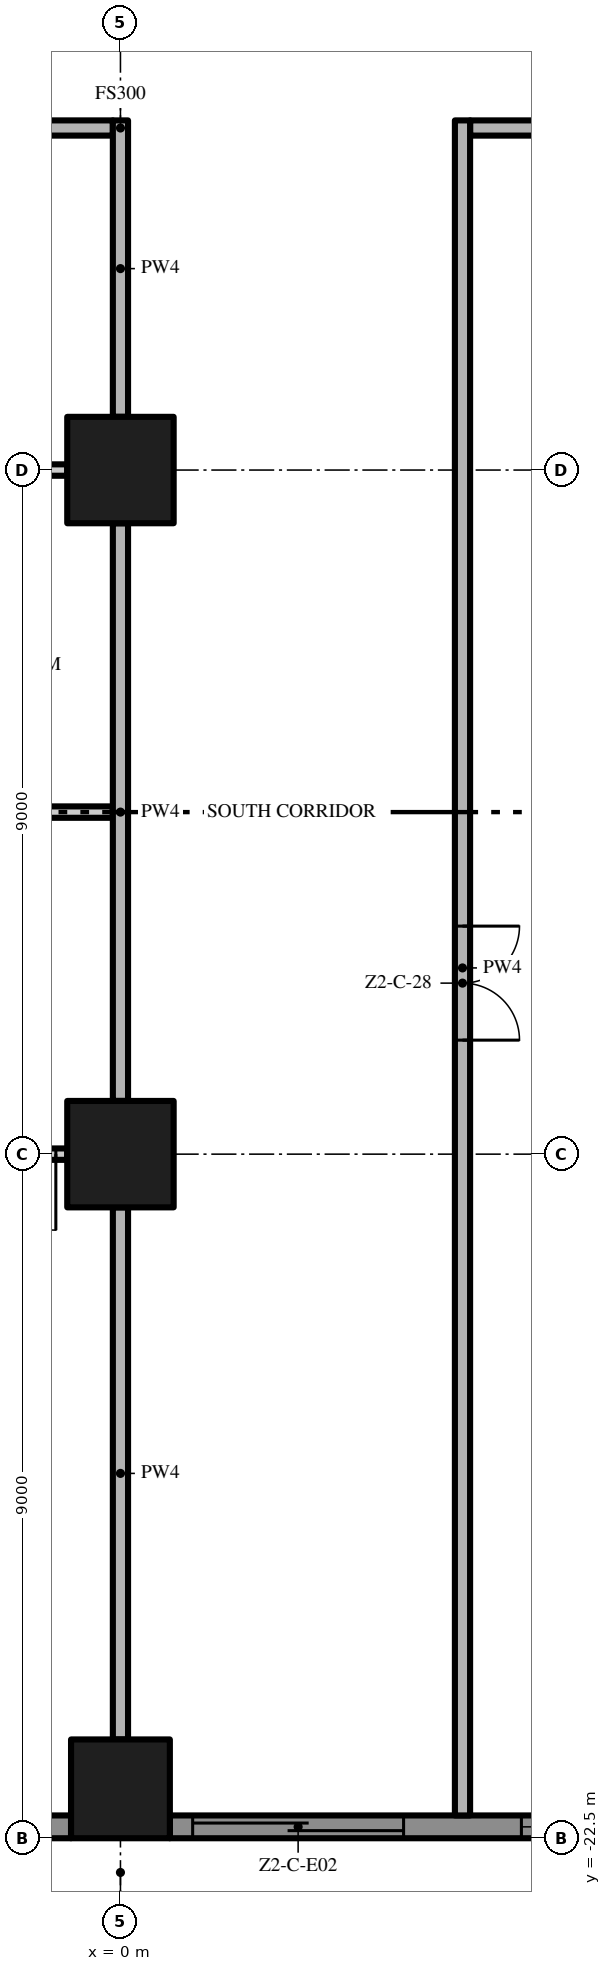
"""IFC4 building model, lengths in metres.
Left out: names, types, materials, properties, quantities, classifications, styles, units other than length and angle.
Written with IfcOpenShell. Run it as: python <this file> out.ifc"""

import sys

from ifc_helpers import new_model, si_unit, direction, frame, frame_2d, origin, origin_2d, place, context, subcontext, project, spatial, polyline, rectangle, outline, extrude, element, fill, save


model = new_model("IFC4")
c1 = context("Model", 3, precision=1e-05, world=origin(), true_north=direction((0.0, 1.0)))
c2 = subcontext(c1, "Body", "Model", "MODEL_VIEW")
j1 = project(units=[si_unit("LENGTHUNIT", "METRE"), si_unit("PLANEANGLEUNIT", "RADIAN")], contexts=[c1])
p1 = place(None, origin())
s1 = spatial("IfcSite", under=j1, at=p1, CompositionType="ELEMENT")
p2 = place(p1, origin())
s2 = spatial("IfcBuilding", under=s1, at=p2, CompositionType="ELEMENT")
p3 = place(p2, frame((0.0, 0.0, 96.0)))
s3 = spatial("IfcBuildingStorey", under=s2, at=p3, CompositionType="ELEMENT", Elevation=96.0)
p4 = place(p3, frame((0.0, -13.5, 0.0), z_axis=(0.0, 0.0, 1.0), x_axis=(1.0, 0.0, 0.0)))
e1 = element("IfcColumn", 1, at=p4, inside=s3, PredefinedType="COLUMN", context=c2, shape_type="SweptSolid", body=[
    extrude(rectangle(XDim=1.4, YDim=1.4, at=origin_2d()), origin(), (0.0, 0.0, 1.0), 3.5),
])
p5 = place(p3, frame((0.0, -21.85, 0.0), z_axis=(0.0, 0.0, 1.0), x_axis=(1.0, 0.0, 0.0)))
e2 = element("IfcColumn", 2, at=p5, inside=s3, PredefinedType="COLUMN", context=c2, shape_type="SweptSolid", body=[
    extrude(rectangle(XDim=1.3, YDim=1.3, at=origin_2d()), origin(), (0.0, 0.0, 1.0), 3.5),
])
p6 = place(p3, frame((0.0, -4.5, 0.0), z_axis=(0.0, 0.0, 1.0), x_axis=(1.0, 0.0, 0.0)))
e3 = element("IfcColumn", 3, at=p6, inside=s3, PredefinedType="COLUMN", context=c2, shape_type="SweptSolid", body=[
    extrude(rectangle(XDim=1.4, YDim=1.4, at=origin_2d()), origin(), (0.0, 0.0, 1.0), 3.5),
])
p7 = place(p3, frame((-0.65, -22.35, 0.0), z_axis=(0.0, 0.0, 1.0), x_axis=(-1.0, 0.0, 0.0)))
e4 = element("IfcWall", 4, at=p7, inside=s3, PredefinedType="SOLIDWALL", context=c2, shape_type="SweptSolid", body=[
    extrude(rectangle(XDim=7.7, YDim=0.3, at=frame_2d((3.85, 0.0))), origin(), (0.0, 0.0, 1.0), 3.5),
])
p8 = place(p7, frame((4.625, 0.0, 0.45)))
e5 = element("IfcOpeningElement", 5, at=p8, cuts=e4, PredefinedType="OPENING", context=c2, shape_type="SweptSolid", body=[
    extrude(rectangle(XDim=2.775, YDim=2.65, at=frame_2d((1.387, 1.325))), frame((0.0, 0.16, 0.0), z_axis=(0.0, -1.0, 0.0), x_axis=(1.0, 0.0, 0.0)), (0.0, 0.0, 1.0), 0.32),
])
p9 = place(p7, frame((0.3, 0.0, 0.45)))
e6 = element("IfcOpeningElement", 6, at=p9, cuts=e4, PredefinedType="OPENING", context=c2, shape_type="SweptSolid", body=[
    extrude(rectangle(XDim=2.775, YDim=2.65, at=frame_2d((1.387, 1.325))), frame((0.0, 0.16, 0.0), z_axis=(0.0, -1.0, 0.0), x_axis=(1.0, 0.0, 0.0)), (0.0, 0.0, 1.0), 0.32),
])
p10 = place(p3, frame((8.35, -22.35, 0.0), z_axis=(0.0, 0.0, 1.0), x_axis=(-1.0, 0.0, 0.0)))
e7 = element("IfcWall", 7, at=p10, inside=s3, PredefinedType="SOLIDWALL", context=c2, shape_type="SweptSolid", body=[
    extrude(rectangle(XDim=7.7, YDim=0.3, at=frame_2d((3.85, 0.0))), origin(), (0.0, 0.0, 1.0), 3.5),
])
p11 = place(p10, frame((4.625, 0.0, 0.0)))
e8 = element("IfcOpeningElement", 8, at=p11, cuts=e7, PredefinedType="OPENING", context=c2, shape_type="SweptSolid", body=[
    extrude(rectangle(XDim=2.775, YDim=2.4, at=frame_2d((1.387, 1.2))), frame((0.0, 0.16, 0.0), z_axis=(0.0, -1.0, 0.0), x_axis=(1.0, 0.0, 0.0)), (0.0, 0.0, 1.0), 0.32),
])
p12 = place(p10, frame((0.3, 0.0, 0.45)))
e9 = element("IfcOpeningElement", 9, at=p12, cuts=e7, PredefinedType="OPENING", context=c2, shape_type="SweptSolid", body=[
    extrude(rectangle(XDim=2.775, YDim=2.65, at=frame_2d((1.387, 1.325))), frame((0.0, 0.16, 0.0), z_axis=(0.0, -1.0, 0.0), x_axis=(1.0, 0.0, 0.0)), (0.0, 0.0, 1.0), 0.32),
])
p13 = place(p3, origin())
e10 = element("IfcWall", 10, at=p13, inside=s3, PredefinedType="USERDEFINED", context=c2, shape_type="SweptSolid", body=[
    extrude(outline(polyline([(-22.5, -23.451), (-21.0, -23.115), (-20.625, -23.1), (-19.5, -23.231), (-18.0, -23.755), (-16.5, -24.488), (-15.0, -25.149), (-13.5, -25.485), (-13.125, -25.5), (-12.0, -25.369), (-10.5, -24.845), (-9.0, -24.112), (-7.5, -23.451), (-6.0, -23.115), (-5.625, -23.1), (-4.5, -23.231), (-3.0, -23.755), (-1.5, -24.488), (0.0, -25.149), (1.5, -25.485), (1.875, -25.5), (3.0, -25.369), (4.5, -24.845), (6.0, -24.112), (7.5, -23.451), (9.0, -23.115), (9.375, -23.1), (10.5, -23.231), (12.0, -23.755), (13.5, -24.488), (15.0, -25.149), (16.5, -25.485), (16.875, -25.5), (18.0, -25.369), (19.5, -24.845), (21.0, -24.112), (22.5, -23.451), (22.399, -23.223), (20.895, -23.885), (19.404, -24.614), (17.944, -25.124), (16.865, -25.249), (16.533, -25.236), (15.079, -24.91), (13.605, -24.261), (12.096, -23.524), (10.556, -22.986), (9.385, -22.849), (8.967, -22.866), (7.421, -23.213), (5.895, -23.885), (4.404, -24.614), (2.944, -25.124), (1.865, -25.249), (1.533, -25.236), (0.079, -24.91), (-1.395, -24.261), (-2.904, -23.524), (-4.444, -22.986), (-5.615, -22.849), (-6.033, -22.866), (-7.579, -23.213), (-9.105, -23.885), (-10.596, -24.614), (-12.056, -25.124), (-13.135, -25.249), (-13.467, -25.236), (-14.921, -24.91), (-16.395, -24.261), (-17.904, -23.524), (-19.444, -22.986), (-20.615, -22.849), (-21.033, -22.866), (-22.555, -23.208), (-22.5, -23.451)])), origin(), (0.0, 0.0, 1.0), 0.9),
])
p14 = place(p3, frame((-0.7, -13.5, 0.0), z_axis=(0.0, 0.0, 1.0), x_axis=(-1.0, 0.0, 0.0)))
e11 = element("IfcWall", 11, at=p14, inside=s3, PredefinedType="PARTITIONING", context=c2, shape_type="SweptSolid", body=[
    extrude(rectangle(XDim=7.6, YDim=0.15, at=frame_2d((3.8, 0.0))), origin(), (0.0, 0.0, 1.0), 3.5),
])
p15 = place(p14, frame((6.45, 0.0, 0.0)))
e12 = element("IfcOpeningElement", 12, at=p15, cuts=e11, PredefinedType="OPENING", context=c2, shape_type="SweptSolid", body=[
    extrude(rectangle(XDim=1.0, YDim=2.4, at=frame_2d((0.5, 1.2))), frame((0.0, 0.085, 0.0), z_axis=(0.0, -1.0, 0.0), x_axis=(1.0, 0.0, 0.0)), (0.0, 0.0, 1.0), 0.17),
])
p16 = place(p14, frame((0.15, 0.0, 0.0)))
e13 = element("IfcOpeningElement", 13, at=p16, cuts=e11, PredefinedType="OPENING", context=c2, shape_type="SweptSolid", body=[
    extrude(rectangle(XDim=1.0, YDim=2.4, at=frame_2d((0.5, 1.2))), frame((0.0, 0.085, 0.0), z_axis=(0.0, -1.0, 0.0), x_axis=(1.0, 0.0, 0.0)), (0.0, 0.0, 1.0), 0.17),
])
p17 = place(p3, frame((-11.925, -9.0, 0.0), z_axis=(0.0, 0.0, 1.0), x_axis=(1.0, 0.0, 0.0)))
e14 = element("IfcWall", 14, at=p17, inside=s3, PredefinedType="PARTITIONING", context=c2, shape_type="SweptSolid", body=[
    extrude(rectangle(XDim=11.825, YDim=0.15, at=frame_2d((5.912, 0.0))), origin(), (0.0, 0.0, 1.0), 3.5),
])
p18 = place(p17, frame((1.0, 0.0, 0.0)))
e15 = element("IfcOpeningElement", 15, at=p18, cuts=e14, PredefinedType="OPENING", context=c2, shape_type="SweptSolid", body=[
    extrude(rectangle(XDim=0.9, YDim=2.1, at=frame_2d((0.45, 1.05))), frame((0.0, 0.085, 0.0), z_axis=(0.0, -1.0, 0.0), x_axis=(1.0, 0.0, 0.0)), (0.0, 0.0, 1.0), 0.17),
])
p19 = place(p17, frame((5.075, 0.0, 0.0)))
e16 = element("IfcOpeningElement", 16, at=p19, cuts=e14, PredefinedType="OPENING", context=c2, shape_type="SweptSolid", body=[
    extrude(rectangle(XDim=0.9, YDim=2.1, at=frame_2d((0.45, 1.05))), frame((0.0, 0.085, 0.0), z_axis=(0.0, -1.0, 0.0), x_axis=(1.0, 0.0, 0.0)), (0.0, 0.0, 1.0), 0.17),
])
p20 = place(p3, frame((-8.3, -4.5, 0.0), z_axis=(0.0, 0.0, 1.0), x_axis=(1.0, 0.0, 0.0)))
e17 = element("IfcWall", 17, at=p20, inside=s3, PredefinedType="PARTITIONING", context=c2, shape_type="SweptSolid", body=[
    extrude(rectangle(XDim=7.6, YDim=0.15, at=frame_2d((3.8, 0.0))), origin(), (0.0, 0.0, 1.0), 3.5),
])
p21 = place(p3, frame((-0.1, 0.0, 0.0), z_axis=(0.0, 0.0, 1.0), x_axis=(-1.0, 0.0, 0.0)))
e18 = element("IfcWall", 18, at=p21, inside=s3, PredefinedType="PARTITIONING", context=c2, shape_type="SweptSolid", body=[
    extrude(rectangle(XDim=17.3, YDim=0.2, at=frame_2d((8.65, 0.0))), origin(), (0.0, 0.0, 1.0), 3.5),
])
p22 = place(p21, frame((8.15, 0.0, 0.0)))
e19 = element("IfcOpeningElement", 19, at=p22, cuts=e18, PredefinedType="OPENING", context=c2, shape_type="SweptSolid", body=[
    extrude(rectangle(XDim=1.5, YDim=2.4, at=frame_2d((0.75, 1.2))), frame((0.0, 0.11, 0.0), z_axis=(0.0, -1.0, 0.0), x_axis=(1.0, 0.0, 0.0)), (0.0, 0.0, 1.0), 0.22),
])
p23 = place(p3, frame((4.6, 0.0, 0.0), z_axis=(0.0, 0.0, 1.0), x_axis=(1.0, 0.0, 0.0)))
e20 = element("IfcWall", 20, at=p23, inside=s3, PredefinedType="PARTITIONING", context=c2, shape_type="SweptSolid", body=[
    extrude(rectangle(XDim=12.8, YDim=0.2, at=frame_2d((6.4, 0.0))), origin(), (0.0, 0.0, 1.0), 3.5),
])
p24 = place(p3, frame((0.0, -21.2, 0.0), z_axis=(0.0, 0.0, 1.0), x_axis=(0.0, 1.0, 0.0)))
e21 = element("IfcWall", 21, at=p24, inside=s3, PredefinedType="PARTITIONING", context=c2, shape_type="SweptSolid", body=[
    extrude(rectangle(XDim=7.0, YDim=0.2, at=frame_2d((3.5, 0.0))), origin(), (0.0, 0.0, 1.0), 3.5),
])
p25 = place(p3, frame((0.0, -12.8, 0.0), z_axis=(0.0, 0.0, 1.0), x_axis=(0.0, 1.0, 0.0)))
e22 = element("IfcWall", 22, at=p25, inside=s3, PredefinedType="PARTITIONING", context=c2, shape_type="SweptSolid", body=[
    extrude(rectangle(XDim=7.6, YDim=0.2, at=frame_2d((3.8, 0.0))), origin(), (0.0, 0.0, 1.0), 3.5),
])
p26 = place(p3, frame((0.0, -3.8, 0.0), z_axis=(0.0, 0.0, 1.0), x_axis=(0.0, 1.0, 0.0)))
e23 = element("IfcWall", 23, at=p26, inside=s3, PredefinedType="PARTITIONING", context=c2, shape_type="SweptSolid", body=[
    extrude(rectangle(XDim=3.9, YDim=0.2, at=frame_2d((1.95, 0.0))), origin(), (0.0, 0.0, 1.0), 3.5),
])
p27 = place(p3, frame((4.5, 0.1, 0.0), z_axis=(0.0, 0.0, 1.0), x_axis=(0.0, -1.0, 0.0)))
e24 = element("IfcWall", 24, at=p27, inside=s3, PredefinedType="PARTITIONING", context=c2, shape_type="SweptSolid", body=[
    extrude(rectangle(XDim=22.3, YDim=0.2, at=frame_2d((11.15, 0.0))), origin(), (0.0, 0.0, 1.0), 3.5),
])
p28 = place(p27, frame((10.6, 0.0, 0.0)))
e25 = element("IfcOpeningElement", 25, at=p28, cuts=e24, PredefinedType="OPENING", context=c2, shape_type="SweptSolid", body=[
    extrude(rectangle(XDim=1.5, YDim=2.4, at=frame_2d((0.75, 1.2))), frame((0.0, 0.11, 0.0), z_axis=(0.0, -1.0, 0.0), x_axis=(1.0, 0.0, 0.0)), (0.0, 0.0, 1.0), 0.22),
])
p29 = place(p11, origin())
e26 = element("IfcDoor", 26, at=p29, inside=s3, OperationType="SINGLE_SWING_LEFT", PredefinedType="DOOR", context=c2, shape_type="SweptSolid", body=[
    extrude(rectangle(XDim=2.775, YDim=2.4, at=frame_2d((1.387, 1.2))), frame((0.0, 0.025, 0.0), z_axis=(0.0, -1.0, 0.0), x_axis=(1.0, 0.0, 0.0)), (0.0, 0.0, 1.0), 0.05),
])
fill(e8, e26)
p30 = place(p12, origin())
e27 = element("IfcWindow", 27, at=p30, inside=s3, PartitioningType="SINGLE_PANEL", PredefinedType="WINDOW", context=c2, shape_type="SweptSolid", body=[
    extrude(rectangle(XDim=2.775, YDim=2.65, at=frame_2d((1.387, 1.325))), frame((0.0, 0.03, 0.0), z_axis=(0.0, -1.0, 0.0), x_axis=(1.0, 0.0, 0.0)), (0.0, 0.0, 1.0), 0.06),
])
fill(e9, e27)
p31 = place(p16, origin())
e28 = element("IfcDoor", 28, at=p31, inside=s3, OperationType="SINGLE_SWING_LEFT", PredefinedType="DOOR", context=c2, shape_type="SweptSolid", body=[
    extrude(rectangle(XDim=1.0, YDim=2.4, at=frame_2d((0.5, 1.2))), frame((0.0, 0.025, 0.0), z_axis=(0.0, -1.0, 0.0), x_axis=(1.0, 0.0, 0.0)), (0.0, 0.0, 1.0), 0.05),
])
fill(e13, e28)
p32 = place(p28, origin())
e29 = element("IfcDoor", 29, at=p32, inside=s3, OperationType="DOUBLE_DOOR_SINGLE_SWING", PredefinedType="DOOR", context=c2, shape_type="SweptSolid", body=[
    extrude(rectangle(XDim=1.5, YDim=2.4, at=frame_2d((0.75, 1.2))), frame((0.0, 0.025, 0.0), z_axis=(0.0, -1.0, 0.0), x_axis=(1.0, 0.0, 0.0)), (0.0, 0.0, 1.0), 0.05),
])
fill(e25, e29)
save(model, sys.argv[1])
